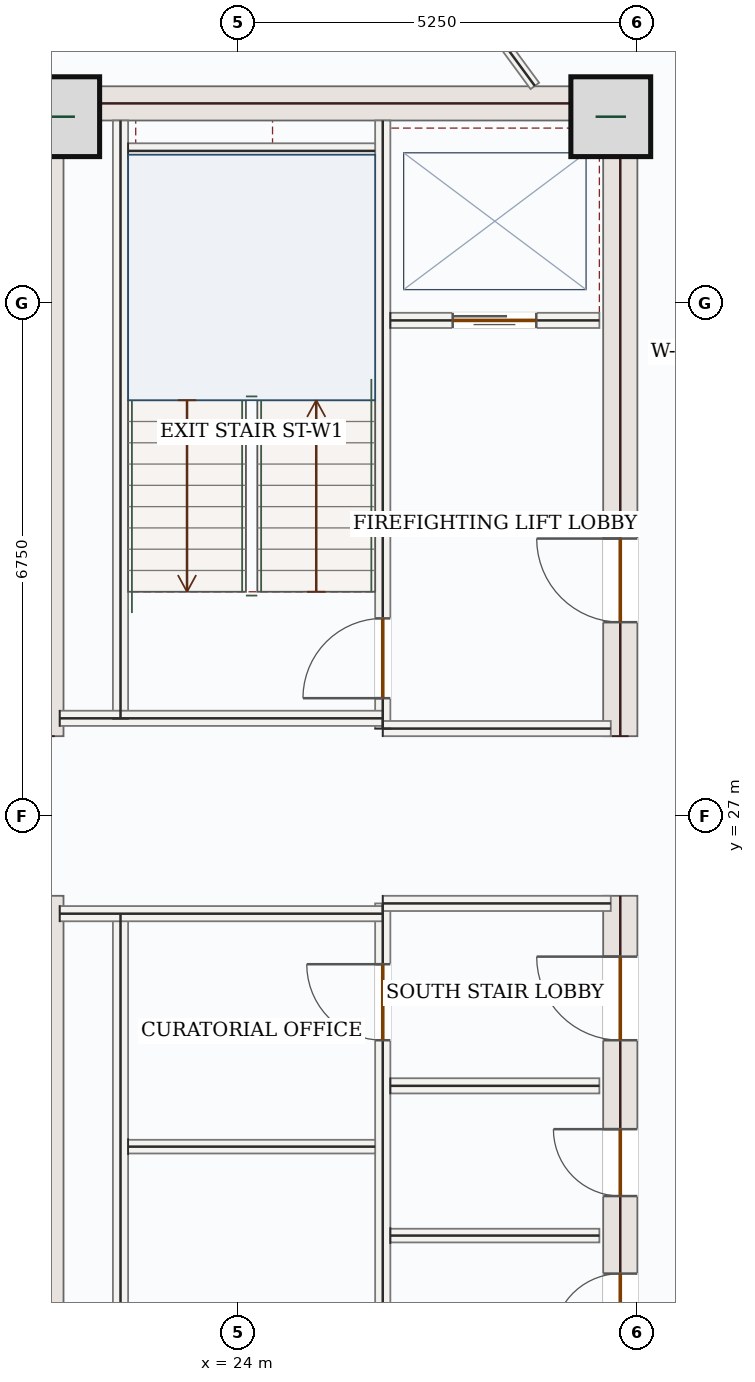
"""IFC4 building model, lengths in metres.
Left out: names, types, materials, properties, quantities, classifications, styles, units other than length and angle.
Written with IfcOpenShell. Run it as: python <this file> out.ifc"""

import sys

from ifc_helpers import new_model, si_unit, direction, frame, frame_2d, origin, origin_2d, place, context, subcontext, project, spatial, rectangle, extrude, source, transform, mapped, element, fill, save


model = new_model("IFC4")
c1 = context("Model", 3, precision=1e-05, world=origin(), true_north=direction((0.0, 1.0)))
c2 = subcontext(c1, "Body", "Model", "MODEL_VIEW")
j1 = project(units=[si_unit("LENGTHUNIT", "METRE"), si_unit("PLANEANGLEUNIT", "RADIAN")], contexts=[c1])
p1 = place(None, origin())
s1 = spatial("IfcSite", under=j1, at=p1, CompositionType="ELEMENT")
p2 = place(p1, origin())
s2 = spatial("IfcBuilding", under=s1, at=p2, CompositionType="ELEMENT")
p3 = place(p2, frame((0.0, 0.0, 276.6)))
s3 = spatial("IfcBuildingStorey", under=s2, at=p3, CompositionType="ELEMENT", Elevation=276.6)
m1 = source(origin(), c2, "Body", "SweptSolid", [
    extrude(rectangle(XDim=8.55, YDim=0.45, at=frame_2d((4.275, 0.0))), origin(), (0.0, 0.0, 1.0), 3.5),
])
for number, where, z_axis, x_axis in (
    (1, (21.475, 17.4, 0.0), (0.0, 0.0, 1.0), (0.0, 1.0, 0.0)),
    (2, (21.475, 28.05, 0.0), (0.0, 0.0, 1.0), (0.0, 1.0, 0.0)),
):
    element("IfcWall", number, at=place(p3, frame(where, z_axis=z_axis, x_axis=x_axis)), inside=s3, PredefinedType="SHEAR", context=c2, shape_type="MappedRepresentation", body=[
        mapped(m1, transform((0.0, 0.0, 0.0), x_axis=(1.0, 0.0, 0.0), y_axis=(0.0, 1.0, 0.0), z_axis=(0.0, 0.0, 1.0), scale=1.0)),
    ])
p4 = place(p3, frame((29.025, 17.4, 0.0), z_axis=(0.0, 0.0, 1.0), x_axis=(0.0, 1.0, 0.0)))
e3 = element("IfcWall", 3, at=p4, inside=s3, PredefinedType="SHEAR", context=c2, shape_type="SweptSolid", body=[
    extrude(rectangle(XDim=8.55, YDim=0.45, at=frame_2d((4.275, 0.0))), origin(), (0.0, 0.0, 1.0), 3.5),
])
p5 = place(p4, frame((6.65, 0.0, 0.0)))
e4 = element("IfcOpeningElement", 4, at=p5, cuts=e3, PredefinedType="OPENING", context=c2, shape_type="SweptSolid", body=[
    extrude(rectangle(XDim=1.1, YDim=2.2, at=frame_2d((0.55, 1.1))), frame((0.0, 0.235, 0.0), z_axis=(0.0, -1.0, 0.0), x_axis=(1.0, 0.0, 0.0)), (0.0, 0.0, 1.0), 0.47),
])
p6 = place(p4, frame((2.7, 0.0, 0.0)))
e5 = element("IfcOpeningElement", 5, at=p6, cuts=e3, PredefinedType="OPENING", context=c2, shape_type="SweptSolid", body=[
    extrude(rectangle(XDim=0.88, YDim=2.1, at=frame_2d((0.44, 1.05))), frame((0.0, 0.235, 0.0), z_axis=(0.0, -1.0, 0.0), x_axis=(1.0, 0.0, 0.0)), (0.0, 0.0, 1.0), 0.47),
])
p7 = place(p4, frame((4.6, 0.0, 0.0)))
e6 = element("IfcOpeningElement", 6, at=p7, cuts=e3, PredefinedType="OPENING", context=c2, shape_type="SweptSolid", body=[
    extrude(rectangle(XDim=0.88, YDim=2.1, at=frame_2d((0.44, 1.05))), frame((0.0, 0.235, 0.0), z_axis=(0.0, -1.0, 0.0), x_axis=(1.0, 0.0, 0.0)), (0.0, 0.0, 1.0), 0.47),
])
p8 = place(p3, frame((29.025, 28.05, 0.0), z_axis=(0.0, 0.0, 1.0), x_axis=(0.0, 1.0, 0.0)))
e7 = element("IfcWall", 7, at=p8, inside=s3, PredefinedType="SHEAR", context=c2, shape_type="SweptSolid", body=[
    extrude(rectangle(XDim=8.55, YDim=0.45, at=frame_2d((4.275, 0.0))), origin(), (0.0, 0.0, 1.0), 3.5),
])
p9 = place(p8, frame((1.5, 0.0, 0.0)))
e8 = element("IfcOpeningElement", 8, at=p9, cuts=e7, PredefinedType="OPENING", context=c2, shape_type="SweptSolid", body=[
    extrude(rectangle(XDim=1.1, YDim=2.2, at=frame_2d((0.55, 1.1))), frame((0.0, 0.235, 0.0), z_axis=(0.0, -1.0, 0.0), x_axis=(1.0, 0.0, 0.0)), (0.0, 0.0, 1.0), 0.47),
])
m2 = source(origin(), c2, "Body", "SweptSolid", [
    extrude(rectangle(XDim=7.1, YDim=0.45, at=frame_2d((3.55, 0.0))), origin(), (0.0, 0.0, 1.0), 3.5),
])
p10 = place(p3, frame((21.7, 36.375, 0.0), z_axis=(0.0, 0.0, 1.0), x_axis=(1.0, 0.0, 0.0)))
e9 = element("IfcWall", 9, at=p10, inside=s3, PredefinedType="SHEAR", context=c2, shape_type="MappedRepresentation", body=[
    mapped(m2, transform((0.0, 0.0, 0.0), x_axis=(1.0, 0.0, 0.0), y_axis=(0.0, 1.0, 0.0), z_axis=(0.0, 0.0, 1.0), scale=1.0)),
])
m3 = source(origin(), c2, "Body", "SweptSolid", [
    extrude(rectangle(XDim=1.05, YDim=1.05, at=origin_2d()), origin(), (0.0, 0.0, 1.0), 3.75),
])
for number, where, z_axis, x_axis in (
    (10, (21.65, 36.2, 0.0), (0.0, 0.0, 1.0), (1.0, 0.0, 0.0)),
    (11, (28.9, 36.2, 0.0), (0.0, 0.0, 1.0), (1.0, 0.0, 0.0)),
):
    element("IfcColumn", number, at=place(p3, frame(where, z_axis=z_axis, x_axis=x_axis)), inside=s3, PredefinedType="COLUMN", context=c2, shape_type="MappedRepresentation", body=[
        mapped(m3, transform((0.0, 0.0, 0.0), x_axis=(1.0, 0.0, 0.0), y_axis=(0.0, 1.0, 0.0), z_axis=(0.0, 0.0, 1.0), scale=1.0)),
    ])
m4 = source(origin(), c2, "Body", "SweptSolid", [
    extrude(rectangle(XDim=7.87, YDim=0.2, at=frame_2d((3.935, 0.0))), origin(), (0.0, 0.0, 1.0), 3.5),
])
for number, where, z_axis, x_axis in (
    (12, (22.45, 17.85, 0.0), (0.0, 0.0, 1.0), (0.0, 1.0, 0.0)),
    (13, (22.45, 28.28, 0.0), (0.0, 0.0, 1.0), (0.0, 1.0, 0.0)),
):
    element("IfcWall", number, at=place(p3, frame(where, z_axis=z_axis, x_axis=x_axis)), inside=s3, PredefinedType="SOLIDWALL", context=c2, shape_type="MappedRepresentation", body=[
        mapped(m4, transform((0.0, 0.0, 0.0), x_axis=(1.0, 0.0, 0.0), y_axis=(0.0, 1.0, 0.0), z_axis=(0.0, 0.0, 1.0), scale=1.0)),
    ])
p11 = place(p3, frame((25.9, 17.85, 0.0), z_axis=(0.0, 0.0, 1.0), x_axis=(0.0, 1.0, 0.0)))
e14 = element("IfcWall", 14, at=p11, inside=s3, PredefinedType="SOLIDWALL", context=c2, shape_type="SweptSolid", body=[
    extrude(rectangle(XDim=8.0, YDim=0.2, at=frame_2d((4.0, 0.0))), origin(), (0.0, 0.0, 1.0), 3.5),
])
p12 = place(p11, frame((6.2, 0.0, 0.0)))
e15 = element("IfcOpeningElement", 15, at=p12, cuts=e14, PredefinedType="OPENING", context=c2, shape_type="SweptSolid", body=[
    extrude(rectangle(XDim=1.0, YDim=2.15, at=frame_2d((0.5, 1.075))), frame((0.0, 0.11, 0.0), z_axis=(0.0, -1.0, 0.0), x_axis=(1.0, 0.0, 0.0)), (0.0, 0.0, 1.0), 0.22),
])
p13 = place(p11, frame((0.6, 0.0, 0.0)))
e16 = element("IfcOpeningElement", 16, at=p13, cuts=e14, PredefinedType="OPENING", context=c2, shape_type="SweptSolid", body=[
    extrude(rectangle(XDim=0.88, YDim=2.1, at=frame_2d((0.44, 1.05))), frame((0.0, 0.11, 0.0), z_axis=(0.0, -1.0, 0.0), x_axis=(1.0, 0.0, 0.0)), (0.0, 0.0, 1.0), 0.22),
])
p14 = place(p3, frame((25.9, 28.15, 0.0), z_axis=(0.0, 0.0, 1.0), x_axis=(0.0, 1.0, 0.0)))
e17 = element("IfcWall", 17, at=p14, inside=s3, PredefinedType="SOLIDWALL", context=c2, shape_type="SweptSolid", body=[
    extrude(rectangle(XDim=8.0, YDim=0.2, at=frame_2d((4.0, 0.0))), origin(), (0.0, 0.0, 1.0), 3.5),
])
p15 = place(p14, frame((0.4, 0.0, 0.0)))
e18 = element("IfcOpeningElement", 18, at=p15, cuts=e17, PredefinedType="OPENING", context=c2, shape_type="SweptSolid", body=[
    extrude(rectangle(XDim=1.05, YDim=2.15, at=frame_2d((0.525, 1.075))), frame((0.0, 0.11, 0.0), z_axis=(0.0, -1.0, 0.0), x_axis=(1.0, 0.0, 0.0)), (0.0, 0.0, 1.0), 0.22),
])
m5 = source(origin(), c2, "Body", "SweptSolid", [
    extrude(rectangle(XDim=4.25, YDim=0.2, at=frame_2d((2.125, 0.0))), origin(), (0.0, 0.0, 1.0), 3.5),
])
p16 = place(p3, frame((21.65, 25.715, 0.0), z_axis=(0.0, 0.0, 1.0), x_axis=(1.0, 0.0, 0.0)))
e19 = element("IfcWall", 19, at=p16, inside=s3, PredefinedType="SOLIDWALL", context=c2, shape_type="MappedRepresentation", body=[
    mapped(m5, transform((0.0, 0.0, 0.0), x_axis=(1.0, 0.0, 0.0), y_axis=(0.0, 1.0, 0.0), z_axis=(0.0, 0.0, 1.0), scale=1.0)),
])
m6 = source(origin(), c2, "Body", "SweptSolid", [
    extrude(rectangle(XDim=3.0, YDim=0.2, at=frame_2d((1.5, 0.0))), origin(), (0.0, 0.0, 1.0), 3.5),
])
p17 = place(p3, frame((25.9, 25.85, 0.0), z_axis=(0.0, 0.0, 1.0), x_axis=(1.0, 0.0, 0.0)))
e20 = element("IfcWall", 20, at=p17, inside=s3, PredefinedType="SOLIDWALL", context=c2, shape_type="MappedRepresentation", body=[
    mapped(m6, transform((0.0, 0.0, 0.0), x_axis=(1.0, 0.0, 0.0), y_axis=(0.0, 1.0, 0.0), z_axis=(0.0, 0.0, 1.0), scale=1.0)),
])
p18 = place(p3, frame((21.65, 28.285, 0.0), z_axis=(0.0, 0.0, 1.0), x_axis=(1.0, 0.0, 0.0)))
e21 = element("IfcWall", 21, at=p18, inside=s3, PredefinedType="SOLIDWALL", context=c2, shape_type="MappedRepresentation", body=[
    mapped(m5, transform((0.0, 0.0, 0.0), x_axis=(1.0, 0.0, 0.0), y_axis=(0.0, 1.0, 0.0), z_axis=(0.0, 0.0, 1.0), scale=1.0)),
])
p19 = place(p3, frame((25.9, 28.15, 0.0), z_axis=(0.0, 0.0, 1.0), x_axis=(1.0, 0.0, 0.0)))
e22 = element("IfcWall", 22, at=p19, inside=s3, PredefinedType="SOLIDWALL", context=c2, shape_type="MappedRepresentation", body=[
    mapped(m6, transform((0.0, 0.0, 0.0), x_axis=(1.0, 0.0, 0.0), y_axis=(0.0, 1.0, 0.0), z_axis=(0.0, 0.0, 1.0), scale=1.0)),
])
m7 = source(origin(), c2, "Body", "SweptSolid", [
    extrude(rectangle(XDim=3.25, YDim=0.2, at=frame_2d((1.625, 0.0))), origin(), (0.0, 0.0, 1.0), 3.5),
])
p20 = place(p3, frame((22.55, 35.75, 0.0), z_axis=(0.0, 0.0, 1.0), x_axis=(1.0, 0.0, 0.0)))
e23 = element("IfcWall", 23, at=p20, inside=s3, PredefinedType="SOLIDWALL", context=c2, shape_type="MappedRepresentation", body=[
    mapped(m7, transform((0.0, 0.0, 0.0), x_axis=(1.0, 0.0, 0.0), y_axis=(0.0, 1.0, 0.0), z_axis=(0.0, 0.0, 1.0), scale=1.0)),
])
m8 = source(origin(), c2, "Body", "SweptSolid", [
    extrude(rectangle(XDim=3.25, YDim=0.18, at=frame_2d((1.625, 0.0))), origin(), (0.0, 0.0, 1.0), 3.5),
])
p21 = place(p3, frame((22.55, 22.65, 0.0), z_axis=(0.0, 0.0, 1.0), x_axis=(1.0, 0.0, 0.0)))
e24 = element("IfcWall", 24, at=p21, inside=s3, PredefinedType="PARTITIONING", context=c2, shape_type="MappedRepresentation", body=[
    mapped(m8, transform((0.0, 0.0, 0.0), x_axis=(1.0, 0.0, 0.0), y_axis=(0.0, 1.0, 0.0), z_axis=(0.0, 0.0, 1.0), scale=1.0)),
])
p22 = place(p3, frame((26.0, 33.52, 0.0), z_axis=(0.0, 0.0, 1.0), x_axis=(1.0, 0.0, 0.0)))
e25 = element("IfcWall", 25, at=p22, inside=s3, PredefinedType="SOLIDWALL", context=c2, shape_type="SweptSolid", body=[
    extrude(rectangle(XDim=2.75, YDim=0.2, at=frame_2d((1.375, 0.0))), origin(), (0.0, 0.0, 1.0), 3.5),
])
p23 = place(p22, frame((0.82, 0.0, 0.0)))
e26 = element("IfcOpeningElement", 26, at=p23, cuts=e25, PredefinedType="OPENING", context=c2, shape_type="SweptSolid", body=[
    extrude(rectangle(XDim=1.1, YDim=2.15, at=frame_2d((0.55, 1.075))), frame((0.0, 0.11, 0.0), z_axis=(0.0, -1.0, 0.0), x_axis=(1.0, 0.0, 0.0)), (0.0, 0.0, 1.0), 0.22),
])
m9 = source(origin(), c2, "Body", "SweptSolid", [
    extrude(rectangle(XDim=2.75, YDim=0.2, at=frame_2d((1.375, 0.0))), origin(), (0.0, 0.0, 1.0), 3.5),
])
p24 = place(p3, frame((26.0, 23.45, 0.0), z_axis=(0.0, 0.0, 1.0), x_axis=(1.0, 0.0, 0.0)))
e27 = element("IfcWall", 27, at=p24, inside=s3, PredefinedType="SOLIDWALL", context=c2, shape_type="MappedRepresentation", body=[
    mapped(m9, transform((0.0, 0.0, 0.0), x_axis=(1.0, 0.0, 0.0), y_axis=(0.0, 1.0, 0.0), z_axis=(0.0, 0.0, 1.0), scale=1.0)),
])
m10 = source(origin(), c2, "Body", "SweptSolid", [
    extrude(rectangle(XDim=2.75, YDim=0.18, at=frame_2d((1.375, 0.0))), origin(), (0.0, 0.0, 1.0), 3.5),
])
p25 = place(p3, frame((26.0, 21.48, 0.0), z_axis=(0.0, 0.0, 1.0), x_axis=(1.0, 0.0, 0.0)))
e28 = element("IfcWall", 28, at=p25, inside=s3, PredefinedType="PARTITIONING", context=c2, shape_type="MappedRepresentation", body=[
    mapped(m10, transform((0.0, 0.0, 0.0), x_axis=(1.0, 0.0, 0.0), y_axis=(0.0, 1.0, 0.0), z_axis=(0.0, 0.0, 1.0), scale=1.0)),
])
m11 = source(origin(), c2, "Body", "SweptSolid", [
    extrude(rectangle(XDim=7.067, YDim=0.14, at=frame_2d((3.533, 0.0))), origin(), (0.0, 0.0, 1.0), 3.5),
])
p26 = place(p3, frame((23.712, 42.297, 0.0), z_axis=(0.0, 0.0, 1.0), x_axis=(0.592689830588, -0.805430794493, 0.0)))
e29 = element("IfcWall", 29, at=p26, inside=s3, PredefinedType="PARTITIONING", context=c2, shape_type="MappedRepresentation", body=[
    mapped(m11, transform((0.0, 0.0, 0.0), x_axis=(1.0, 0.0, 0.0), y_axis=(0.0, 1.0, 0.0), z_axis=(0.0, 0.0, 1.0), scale=1.0)),
])
m12 = source(origin(), c2, "Body", "SweptSolid", [
    extrude(rectangle(XDim=1.05, YDim=2.15, at=frame_2d((0.525, 1.075))), frame((0.0, 0.025, 0.0), z_axis=(0.0, -1.0, 0.0), x_axis=(1.0, 0.0, 0.0)), (0.0, 0.0, 1.0), 0.05),
])
p27 = place(p15, origin())
e30 = element("IfcDoor", 30, at=p27, inside=s3, OperationType="SINGLE_SWING_LEFT", PredefinedType="DOOR", context=c2, shape_type="MappedRepresentation", body=[
    mapped(m12, transform((0.0, 0.0, 0.0), x_axis=(1.0, 0.0, 0.0), y_axis=(0.0, 1.0, 0.0), z_axis=(0.0, 0.0, 1.0), scale=1.0)),
])
fill(e18, e30)
m13 = source(origin(), c2, "Body", "SweptSolid", [
    extrude(rectangle(XDim=1.0, YDim=2.15, at=frame_2d((0.5, 1.075))), frame((0.0, 0.025, 0.0), z_axis=(0.0, -1.0, 0.0), x_axis=(1.0, 0.0, 0.0)), (0.0, 0.0, 1.0), 0.05),
])
p28 = place(p12, origin())
e31 = element("IfcDoor", 31, at=p28, inside=s3, OperationType="SINGLE_SWING_RIGHT", PredefinedType="DOOR", context=c2, shape_type="MappedRepresentation", body=[
    mapped(m13, transform((0.0, 0.0, 0.0), x_axis=(1.0, 0.0, 0.0), y_axis=(0.0, 1.0, 0.0), z_axis=(0.0, 0.0, 1.0), scale=1.0)),
])
fill(e15, e31)
m14 = source(origin(), c2, "Body", "SweptSolid", [
    extrude(rectangle(XDim=1.1, YDim=2.15, at=frame_2d((0.55, 1.075))), frame((0.0, 0.025, 0.0), z_axis=(0.0, -1.0, 0.0), x_axis=(1.0, 0.0, 0.0)), (0.0, 0.0, 1.0), 0.05),
])
p29 = place(p23, origin())
e32 = element("IfcDoor", 32, at=p29, inside=s3, OperationType="DOUBLE_DOOR_SLIDING", PredefinedType="DOOR", context=c2, shape_type="MappedRepresentation", body=[
    mapped(m14, transform((0.0, 0.0, 0.0), x_axis=(1.0, 0.0, 0.0), y_axis=(0.0, 1.0, 0.0), z_axis=(0.0, 0.0, 1.0), scale=1.0)),
])
fill(e26, e32)
m15 = source(origin(), c2, "Body", "SweptSolid", [
    extrude(rectangle(XDim=1.1, YDim=2.2, at=frame_2d((0.55, 1.1))), frame((0.0, 0.025, 0.0), z_axis=(0.0, -1.0, 0.0), x_axis=(1.0, 0.0, 0.0)), (0.0, 0.0, 1.0), 0.05),
])
p30 = place(p9, origin())
e33 = element("IfcDoor", 33, at=p30, inside=s3, OperationType="SINGLE_SWING_RIGHT", PredefinedType="DOOR", context=c2, shape_type="MappedRepresentation", body=[
    mapped(m15, transform((0.0, 0.0, 0.0), x_axis=(1.0, 0.0, 0.0), y_axis=(0.0, 1.0, 0.0), z_axis=(0.0, 0.0, 1.0), scale=1.0)),
])
fill(e8, e33)
p31 = place(p5, origin())
e34 = element("IfcDoor", 34, at=p31, inside=s3, OperationType="SINGLE_SWING_RIGHT", PredefinedType="DOOR", context=c2, shape_type="MappedRepresentation", body=[
    mapped(m15, transform((0.0, 0.0, 0.0), x_axis=(1.0, 0.0, 0.0), y_axis=(0.0, 1.0, 0.0), z_axis=(0.0, 0.0, 1.0), scale=1.0)),
])
fill(e4, e34)
m16 = source(origin(), c2, "Body", "SweptSolid", [
    extrude(rectangle(XDim=0.88, YDim=2.1, at=frame_2d((0.44, 1.05))), frame((0.0, 0.025, 0.0), z_axis=(0.0, -1.0, 0.0), x_axis=(1.0, 0.0, 0.0)), (0.0, 0.0, 1.0), 0.05),
])
p32 = place(p6, origin())
e35 = element("IfcDoor", 35, at=p32, inside=s3, OperationType="SINGLE_SWING_LEFT", PredefinedType="DOOR", context=c2, shape_type="MappedRepresentation", body=[
    mapped(m16, transform((0.0, 0.0, 0.0), x_axis=(1.0, 0.0, 0.0), y_axis=(0.0, 1.0, 0.0), z_axis=(0.0, 0.0, 1.0), scale=1.0)),
])
fill(e5, e35)
p33 = place(p7, origin())
e36 = element("IfcDoor", 36, at=p33, inside=s3, OperationType="SINGLE_SWING_RIGHT", PredefinedType="DOOR", context=c2, shape_type="MappedRepresentation", body=[
    mapped(m16, transform((0.0, 0.0, 0.0), x_axis=(1.0, 0.0, 0.0), y_axis=(0.0, 1.0, 0.0), z_axis=(0.0, 0.0, 1.0), scale=1.0)),
])
fill(e6, e36)
save(model, sys.argv[1])
